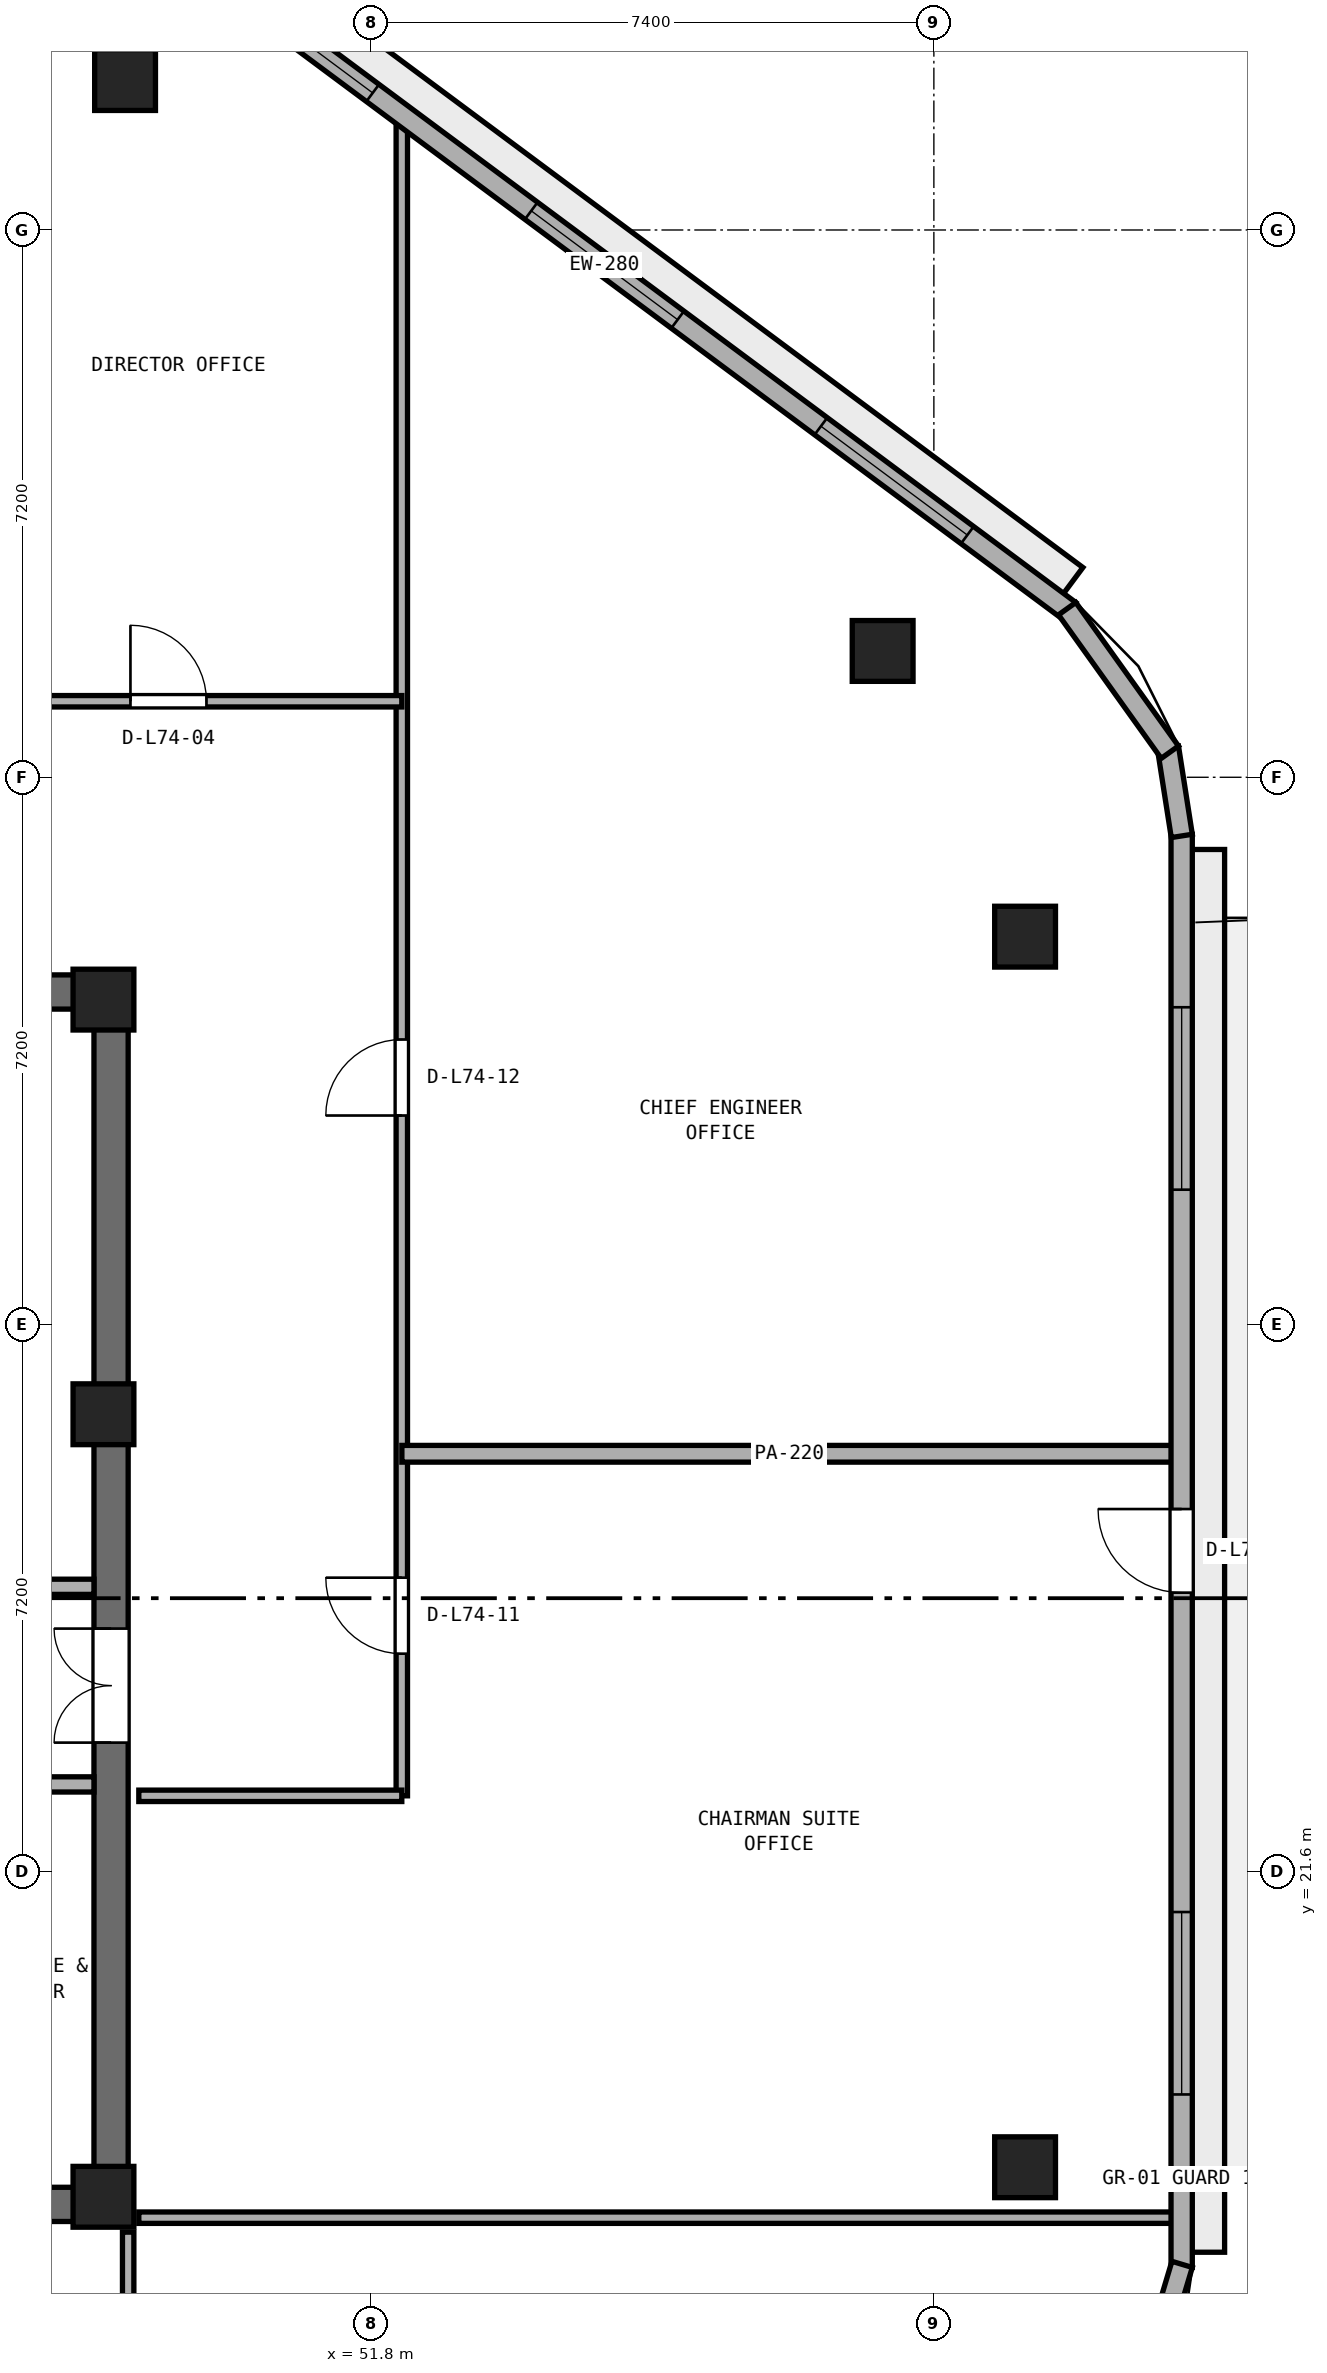
"""IFC4 building model, lengths in metres.
Left out: names, types, materials, properties, quantities, classifications, styles, units other than length and angle.
Written with IfcOpenShell. Run it as: python <this file> out.ifc"""

import sys

from ifc_helpers import new_model, si_unit, direction, frame, frame_2d, origin, origin_2d, place, context, subcontext, project, spatial, rectangle, extrude, element, fill, save


model = new_model("IFC4")
c1 = context("Model", 3, precision=1e-05, world=origin(), true_north=direction((0.0, 1.0)))
c2 = subcontext(c1, "Body", "Model", "MODEL_VIEW")
j1 = project(units=[si_unit("LENGTHUNIT", "METRE"), si_unit("PLANEANGLEUNIT", "RADIAN")], contexts=[c1])
p1 = place(None, origin())
s1 = spatial("IfcSite", under=j1, at=p1, CompositionType="ELEMENT")
p2 = place(p1, origin())
s2 = spatial("IfcBuilding", under=s1, at=p2, CompositionType="ELEMENT")
p3 = place(p2, frame((0.0, 0.0, 289.6)))
s3 = spatial("IfcBuildingStorey", under=s2, at=p3, CompositionType="ELEMENT", Elevation=289.6)
for number, where, z_axis, x_axis in (
    (1, (25.4, 17.225, 0.0), (0.0, 0.0, 1.0), (1.0, 0.0, 0.0)),
    (2, (25.4, 33.175, 0.0), (0.0, 0.0, 1.0), (1.0, 0.0, 0.0)),
):
    element("IfcWall", number, at=place(p3, frame(where, z_axis=z_axis, x_axis=x_axis)), inside=s3, PredefinedType="SHEAR", context=c2, shape_type="SweptSolid", body=[
        extrude(rectangle(XDim=23.2, YDim=0.45, at=frame_2d((11.6, 0.0))), origin(), (0.0, 0.0, 1.0), 3.54),
    ])
p4 = place(p3, frame((48.375, 17.45, 0.0), z_axis=(0.0, 0.0, 1.0), x_axis=(0.0, 1.0, 0.0)))
e3 = element("IfcWall", 3, at=p4, inside=s3, PredefinedType="SHEAR", context=c2, shape_type="SweptSolid", body=[
    extrude(rectangle(XDim=15.5, YDim=0.45, at=frame_2d((7.75, 0.0))), origin(), (0.0, 0.0, 1.0), 3.54),
])
p5 = place(p4, frame((5.85, 0.0, 0.0)))
e4 = element("IfcOpeningElement", 4, at=p5, cuts=e3, PredefinedType="OPENING", context=c2, shape_type="SweptSolid", body=[
    extrude(rectangle(XDim=1.5, YDim=2.15, at=frame_2d((0.75, 1.075))), frame((0.0, 0.235, 0.0), z_axis=(0.0, -1.0, 0.0), x_axis=(1.0, 0.0, 0.0)), (0.0, 0.0, 1.0), 0.47),
])
for number, where, z_axis, x_axis in (
    (5, (48.275, 17.325, 0.0), (0.0, 0.0, 1.0), (1.0, 0.0, 0.0)),
    (6, (48.275, 27.62, 0.0), (0.0, 0.0, 1.0), (1.0, 0.0, 0.0)),
    (7, (48.275, 33.075, 0.0), (0.0, 0.0, 1.0), (1.0, 0.0, 0.0)),
):
    element("IfcColumn", number, at=place(p3, frame(where, z_axis=z_axis, x_axis=x_axis)), inside=s3, PredefinedType="PILASTER", context=c2, shape_type="SweptSolid", body=[
        extrude(rectangle(XDim=0.8, YDim=0.8, at=origin_2d()), origin(), (0.0, 0.0, 1.0), 3.8),
    ])
for number, where, z_axis, x_axis in (
    (8, (60.4, 17.714, 0.0), (0.0, 0.0, 1.0), (1.0, 0.0, 0.0)),
    (9, (60.4, 33.903, 0.0), (0.0, 0.0, 1.0), (1.0, 0.0, 0.0)),
    (10, (58.526, 37.662, 0.0), (0.0, 0.0, 1.0), (1.0, 0.0, 0.0)),
    (11, (48.559, 45.173, 0.0), (0.0, 0.0, 1.0), (1.0, 0.0, 0.0)),
):
    element("IfcColumn", number, at=place(p3, frame(where, z_axis=z_axis, x_axis=x_axis)), inside=s3, PredefinedType="COLUMN", context=c2, shape_type="SweptSolid", body=[
        extrude(rectangle(XDim=0.8, YDim=0.8, at=origin_2d()), origin(), (0.0, 0.0, 1.0), 3.8),
    ])
p6 = place(p3, frame((42.0, 22.75, 0.0), z_axis=(0.0, 0.0, 1.0), x_axis=(1.0, 0.0, 0.0)))
e12 = element("IfcWall", 12, at=p6, inside=s3, PredefinedType="SOLIDWALL", context=c2, shape_type="SweptSolid", body=[
    extrude(rectangle(XDim=6.15, YDim=0.2, at=frame_2d((3.075, 0.0))), origin(), (0.0, 0.0, 1.0), 3.54),
])
p7 = place(p3, frame((46.1, 25.35, 0.0), z_axis=(0.0, 0.0, 1.0), x_axis=(1.0, 0.0, 0.0)))
e13 = element("IfcWall", 13, at=p7, inside=s3, PredefinedType="SOLIDWALL", context=c2, shape_type="SweptSolid", body=[
    extrude(rectangle(XDim=2.05, YDim=0.2, at=frame_2d((1.025, 0.0))), origin(), (0.0, 0.0, 1.0), 3.54),
])
p8 = place(p3, frame((52.2, 22.6, 0.0), z_axis=(0.0, 0.0, 1.0), x_axis=(0.0, 1.0, 0.0)))
e14 = element("IfcWall", 14, at=p8, inside=s3, PredefinedType="PARTITIONING", context=c2, shape_type="SweptSolid", body=[
    extrude(rectangle(XDim=22.153, YDim=0.15, at=frame_2d((11.076, 0.0))), origin(), (0.0, 0.0, 1.0), 3.54),
])
p9 = place(p8, frame((1.87, 0.0, 0.0)))
e15 = element("IfcOpeningElement", 15, at=p9, cuts=e14, PredefinedType="OPENING", context=c2, shape_type="SweptSolid", body=[
    extrude(rectangle(XDim=1.0, YDim=2.12, at=frame_2d((0.5, 1.06))), frame((0.0, 0.085, 0.0), z_axis=(0.0, -1.0, 0.0), x_axis=(1.0, 0.0, 0.0)), (0.0, 0.0, 1.0), 0.17),
])
p10 = place(p8, frame((8.95, 0.0, 0.0)))
e16 = element("IfcOpeningElement", 16, at=p10, cuts=e14, PredefinedType="OPENING", context=c2, shape_type="SweptSolid", body=[
    extrude(rectangle(XDim=1.0, YDim=2.12, at=frame_2d((0.5, 1.06))), frame((0.0, 0.085, 0.0), z_axis=(0.0, -1.0, 0.0), x_axis=(1.0, 0.0, 0.0)), (0.0, 0.0, 1.0), 0.17),
])
p11 = place(p3, frame((48.6, 13.4, 0.0), z_axis=(0.0, 0.0, 1.0), x_axis=(0.0, 1.0, 0.0)))
e17 = element("IfcWall", 17, at=p11, inside=s3, PredefinedType="PARTITIONING", context=c2, shape_type="SweptSolid", body=[
    extrude(rectangle(XDim=3.46, YDim=0.15, at=frame_2d((1.73, 0.0))), origin(), (0.0, 0.0, 1.0), 3.54),
])
p12 = place(p3, frame((48.74, 17.05, 0.0), z_axis=(0.0, 0.0, 1.0), x_axis=(1.0, 0.0, 0.0)))
e18 = element("IfcWall", 18, at=p12, inside=s3, PredefinedType="PARTITIONING", context=c2, shape_type="SweptSolid", body=[
    extrude(rectangle(XDim=13.655, YDim=0.15, at=frame_2d((6.828, 0.0))), origin(), (0.0, 0.0, 1.0), 2.923),
])
p13 = place(p3, frame((48.74, 22.6, 0.0), z_axis=(0.0, 0.0, 1.0), x_axis=(1.0, 0.0, 0.0)))
e19 = element("IfcWall", 19, at=p13, inside=s3, PredefinedType="PARTITIONING", context=c2, shape_type="SweptSolid", body=[
    extrude(rectangle(XDim=3.46, YDim=0.15, at=frame_2d((1.73, 0.0))), origin(), (0.0, 0.0, 1.0), 3.54),
])
p14 = place(p3, frame((52.201, 27.1, 0.0), z_axis=(0.0, 0.0, 1.0), x_axis=(1.0, 0.0, 0.0)))
e20 = element("IfcWall", 20, at=p14, inside=s3, PredefinedType="PARTITIONING", context=c2, shape_type="SweptSolid", body=[
    extrude(rectangle(XDim=10.194, YDim=0.22, at=frame_2d((5.097, 0.0))), origin(), (0.0, 0.0, 1.0), 3.54),
])
p15 = place(p3, frame((38.35, 37.0, 0.0), z_axis=(0.0, 0.0, 1.0), x_axis=(1.0, 0.0, 0.0)))
e21 = element("IfcWall", 21, at=p15, inside=s3, PredefinedType="PARTITIONING", context=c2, shape_type="SweptSolid", body=[
    extrude(rectangle(XDim=13.85, YDim=0.15, at=frame_2d((6.925, 0.0))), origin(), (0.0, 0.0, 1.0), 3.54),
])
p16 = place(p15, frame((10.28, 0.0, 0.0)))
e22 = element("IfcOpeningElement", 22, at=p16, cuts=e21, PredefinedType="OPENING", context=c2, shape_type="SweptSolid", body=[
    extrude(rectangle(XDim=1.0, YDim=2.12, at=frame_2d((0.5, 1.06))), frame((0.0, 0.085, 0.0), z_axis=(0.0, -1.0, 0.0), x_axis=(1.0, 0.0, 0.0)), (0.0, 0.0, 1.0), 0.17),
])
p17 = place(p3, frame((62.46, 16.396, 0.0), z_axis=(0.0, 0.0, 1.0), x_axis=(0.0, 1.0, 0.0)))
e23 = element("IfcWall", 23, at=p17, inside=s3, PredefinedType="STANDARD", context=c2, shape_type="SweptSolid", body=[
    extrude(rectangle(XDim=18.854, YDim=0.28, at=frame_2d((9.427, 0.0))), origin(), (0.0, 0.0, 1.0), 3.54),
])
p18 = place(p17, frame((8.877, 0.0, 0.0)))
e24 = element("IfcOpeningElement", 24, at=p18, cuts=e23, PredefinedType="OPENING", context=c2, shape_type="SweptSolid", body=[
    extrude(rectangle(XDim=1.1, YDim=2.2, at=frame_2d((0.55, 1.1))), frame((0.0, 0.15, 0.0), z_axis=(0.0, -1.0, 0.0), x_axis=(1.0, 0.0, 0.0)), (0.0, 0.0, 1.0), 0.3),
])
p19 = place(p17, frame((2.276, 0.0, 0.9)))
e25 = element("IfcOpeningElement", 25, at=p19, cuts=e23, PredefinedType="OPENING", context=c2, shape_type="SweptSolid", body=[
    extrude(rectangle(XDim=2.4, YDim=1.75, at=frame_2d((1.2, 0.875))), frame((0.0, 0.15, 0.0), z_axis=(0.0, -1.0, 0.0), x_axis=(1.0, 0.0, 0.0)), (0.0, 0.0, 1.0), 0.3),
])
p20 = place(p17, frame((14.179, 0.0, 0.9)))
e26 = element("IfcOpeningElement", 26, at=p20, cuts=e23, PredefinedType="OPENING", context=c2, shape_type="SweptSolid", body=[
    extrude(rectangle(XDim=2.4, YDim=1.75, at=frame_2d((1.2, 0.875))), frame((0.0, 0.15, 0.0), z_axis=(0.0, -1.0, 0.0), x_axis=(1.0, 0.0, 0.0)), (0.0, 0.0, 1.0), 0.3),
])
p21 = place(p3, frame((60.984, 38.187, 0.0), z_axis=(0.0, 0.0, 1.0), x_axis=(-0.802485144343, 0.596672098484, 0.0)))
e27 = element("IfcWall", 27, at=p21, inside=s3, PredefinedType="STANDARD", context=c2, shape_type="SweptSolid", body=[
    extrude(rectangle(XDim=15.248, YDim=0.28, at=frame_2d((7.624, 0.0))), origin(), (0.0, 0.0, 1.0), 3.54),
])
p22 = place(p21, frame((1.675, 0.0, 0.9)))
e28 = element("IfcOpeningElement", 28, at=p22, cuts=e27, PredefinedType="OPENING", context=c2, shape_type="SweptSolid", body=[
    extrude(rectangle(XDim=2.4, YDim=1.75, at=frame_2d((1.2, 0.875))), frame((0.0, 0.15, 0.0), z_axis=(0.0, -1.0, 0.0), x_axis=(1.0, 0.0, 0.0)), (0.0, 0.0, 1.0), 0.3),
])
p23 = place(p21, frame((6.424, 0.0, 0.9)))
e29 = element("IfcOpeningElement", 29, at=p23, cuts=e27, PredefinedType="OPENING", context=c2, shape_type="SweptSolid", body=[
    extrude(rectangle(XDim=2.4, YDim=1.75, at=frame_2d((1.2, 0.875))), frame((0.0, 0.15, 0.0), z_axis=(0.0, -1.0, 0.0), x_axis=(1.0, 0.0, 0.0)), (0.0, 0.0, 1.0), 0.3),
])
p24 = place(p21, frame((11.423, 0.0, 0.9)))
e30 = element("IfcOpeningElement", 30, at=p24, cuts=e27, PredefinedType="OPENING", context=c2, shape_type="SweptSolid", body=[
    extrude(rectangle(XDim=2.4, YDim=1.75, at=frame_2d((1.2, 0.875))), frame((0.0, 0.15, 0.0), z_axis=(0.0, -1.0, 0.0), x_axis=(1.0, 0.0, 0.0)), (0.0, 0.0, 1.0), 0.3),
])
p25 = place(p3, frame((61.839, 14.344, 0.0), z_axis=(0.0, 0.0, 1.0), x_axis=(0.287235049694, 0.957860128739, 0.0)))
e31 = element("IfcWall", 31, at=p25, inside=s3, PredefinedType="STANDARD", context=c2, shape_type="SweptSolid", body=[
    extrude(rectangle(XDim=2.184, YDim=0.28, at=frame_2d((1.092, 0.0))), origin(), (0.0, 0.0, 1.0), 3.54),
])
p26 = place(p3, frame((62.462, 35.229, 0.0), z_axis=(0.0, 0.0, 1.0), x_axis=(-0.15458604025, 0.987979329824, 0.0)))
e32 = element("IfcWall", 32, at=p26, inside=s3, PredefinedType="STANDARD", context=c2, shape_type="SweptSolid", body=[
    extrude(rectangle(XDim=1.175, YDim=0.28, at=frame_2d((0.587, 0.0))), origin(), (0.0, 0.0, 1.0), 3.54),
])
p27 = place(p3, frame((62.304, 36.33, 0.0), z_axis=(0.0, 0.0, 1.0), x_axis=(-0.581795068472, 0.81333541562, 0.0)))
e33 = element("IfcWall", 33, at=p27, inside=s3, PredefinedType="STANDARD", context=c2, shape_type="SweptSolid", body=[
    extrude(rectangle(XDim=2.322, YDim=0.28, at=frame_2d((1.161, 0.0))), origin(), (0.0, 0.0, 1.0), 3.54),
])
p28 = place(p5, origin())
e34 = element("IfcDoor", 34, at=p28, inside=s3, OperationType="DOUBLE_DOOR_SINGLE_SWING", PredefinedType="DOOR", context=c2, shape_type="SweptSolid", body=[
    extrude(rectangle(XDim=1.5, YDim=2.15, at=frame_2d((0.75, 1.075))), frame((0.0, 0.025, 0.0), z_axis=(0.0, -1.0, 0.0), x_axis=(1.0, 0.0, 0.0)), (0.0, 0.0, 1.0), 0.05),
])
fill(e4, e34)
p29 = place(p16, origin())
e35 = element("IfcDoor", 35, at=p29, inside=s3, OperationType="SINGLE_SWING_LEFT", PredefinedType="DOOR", context=c2, shape_type="SweptSolid", body=[
    extrude(rectangle(XDim=1.0, YDim=2.12, at=frame_2d((0.5, 1.06))), frame((0.0, 0.025, 0.0), z_axis=(0.0, -1.0, 0.0), x_axis=(1.0, 0.0, 0.0)), (0.0, 0.0, 1.0), 0.05),
])
fill(e22, e35)
p30 = place(p9, origin())
e36 = element("IfcDoor", 36, at=p30, inside=s3, OperationType="SINGLE_SWING_RIGHT", PredefinedType="DOOR", context=c2, shape_type="SweptSolid", body=[
    extrude(rectangle(XDim=1.0, YDim=2.12, at=frame_2d((0.5, 1.06))), frame((0.0, 0.025, 0.0), z_axis=(0.0, -1.0, 0.0), x_axis=(1.0, 0.0, 0.0)), (0.0, 0.0, 1.0), 0.05),
])
fill(e15, e36)
p31 = place(p10, origin())
e37 = element("IfcDoor", 37, at=p31, inside=s3, OperationType="SINGLE_SWING_LEFT", PredefinedType="DOOR", context=c2, shape_type="SweptSolid", body=[
    extrude(rectangle(XDim=1.0, YDim=2.12, at=frame_2d((0.5, 1.06))), frame((0.0, 0.025, 0.0), z_axis=(0.0, -1.0, 0.0), x_axis=(1.0, 0.0, 0.0)), (0.0, 0.0, 1.0), 0.05),
])
fill(e16, e37)
p32 = place(p18, origin())
e38 = element("IfcDoor", 38, at=p32, inside=s3, OperationType="SINGLE_SWING_RIGHT", PredefinedType="DOOR", context=c2, shape_type="SweptSolid", body=[
    extrude(rectangle(XDim=1.1, YDim=2.2, at=frame_2d((0.55, 1.1))), frame((0.0, 0.025, 0.0), z_axis=(0.0, -1.0, 0.0), x_axis=(1.0, 0.0, 0.0)), (0.0, 0.0, 1.0), 0.05),
])
fill(e24, e38)
p33 = place(p19, origin())
e39 = element("IfcWindow", 39, at=p33, inside=s3, PartitioningType="SINGLE_PANEL", PredefinedType="WINDOW", context=c2, shape_type="SweptSolid", body=[
    extrude(rectangle(XDim=2.4, YDim=1.75, at=frame_2d((1.2, 0.875))), frame((0.0, 0.03, 0.0), z_axis=(0.0, -1.0, 0.0), x_axis=(1.0, 0.0, 0.0)), (0.0, 0.0, 1.0), 0.06),
])
fill(e25, e39)
p34 = place(p20, origin())
e40 = element("IfcWindow", 40, at=p34, inside=s3, PartitioningType="SINGLE_PANEL", PredefinedType="WINDOW", context=c2, shape_type="SweptSolid", body=[
    extrude(rectangle(XDim=2.4, YDim=1.75, at=frame_2d((1.2, 0.875))), frame((0.0, 0.03, 0.0), z_axis=(0.0, -1.0, 0.0), x_axis=(1.0, 0.0, 0.0)), (0.0, 0.0, 1.0), 0.06),
])
fill(e26, e40)
p35 = place(p22, origin())
e41 = element("IfcWindow", 41, at=p35, inside=s3, PartitioningType="SINGLE_PANEL", PredefinedType="WINDOW", context=c2, shape_type="SweptSolid", body=[
    extrude(rectangle(XDim=2.4, YDim=1.75, at=frame_2d((1.2, 0.875))), frame((0.0, 0.03, 0.0), z_axis=(0.0, -1.0, 0.0), x_axis=(1.0, 0.0, 0.0)), (0.0, 0.0, 1.0), 0.06),
])
fill(e28, e41)
p36 = place(p23, origin())
e42 = element("IfcWindow", 42, at=p36, inside=s3, PartitioningType="SINGLE_PANEL", PredefinedType="WINDOW", context=c2, shape_type="SweptSolid", body=[
    extrude(rectangle(XDim=2.4, YDim=1.75, at=frame_2d((1.2, 0.875))), frame((0.0, 0.03, 0.0), z_axis=(0.0, -1.0, 0.0), x_axis=(1.0, 0.0, 0.0)), (0.0, 0.0, 1.0), 0.06),
])
fill(e29, e42)
p37 = place(p24, origin())
e43 = element("IfcWindow", 43, at=p37, inside=s3, PartitioningType="SINGLE_PANEL", PredefinedType="WINDOW", context=c2, shape_type="SweptSolid", body=[
    extrude(rectangle(XDim=2.4, YDim=1.75, at=frame_2d((1.2, 0.875))), frame((0.0, 0.03, 0.0), z_axis=(0.0, -1.0, 0.0), x_axis=(1.0, 0.0, 0.0)), (0.0, 0.0, 1.0), 0.06),
])
fill(e30, e43)
save(model, sys.argv[1])
